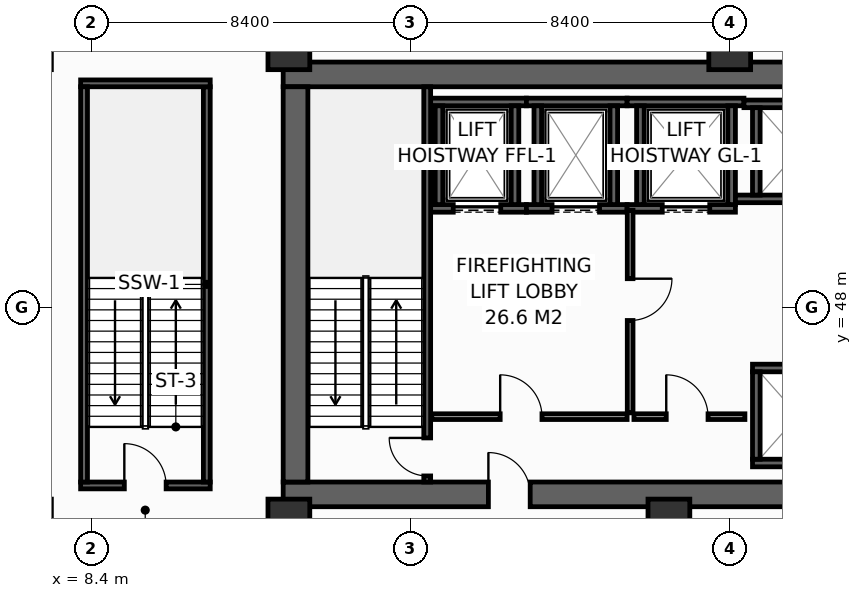
"""IFC4 building model, lengths in metres.
Left out: names, types, materials, properties, quantities, classifications, styles, units other than length and angle.
Written with IfcOpenShell. Run it as: python <this file> out.ifc"""

import sys

from ifc_helpers import new_model, si_unit, direction, frame, frame_2d, origin, origin_2d, place, context, subcontext, project, spatial, rectangle, extrude, element, fill, save


model = new_model("IFC4")
c1 = context("Model", 3, precision=1e-05, world=origin(), true_north=direction((0.0, 1.0)))
c2 = subcontext(c1, "Body", "Model", "MODEL_VIEW")
j1 = project(units=[si_unit("LENGTHUNIT", "METRE"), si_unit("PLANEANGLEUNIT", "RADIAN")], contexts=[c1])
p1 = place(None, origin())
s1 = spatial("IfcSite", under=j1, at=p1, CompositionType="ELEMENT")
p2 = place(p1, origin())
s2 = spatial("IfcBuilding", under=s1, at=p2, CompositionType="ELEMENT")
p3 = place(p2, frame((0.0, 0.0, -5.4)))
s3 = spatial("IfcBuildingStorey", under=s2, at=p3, CompositionType="ELEMENT", Elevation=-5.4)
p4 = place(p3, frame((13.45, 43.075, 0.0), z_axis=(0.0, 0.0, 1.0), x_axis=(1.0, 0.0, 0.0)))
e1 = element("IfcWall", 1, at=p4, inside=s3, PredefinedType="SHEAR", context=c2, shape_type="SweptSolid", body=[
    extrude(rectangle(XDim=33.0, YDim=0.65, at=frame_2d((16.5, 0.0))), origin(), (0.0, 0.0, 1.0), 5.05),
])
p5 = place(p4, frame((5.4, 0.0, 0.0)))
e2 = element("IfcOpeningElement", 2, at=p5, cuts=e1, PredefinedType="OPENING", context=c2, shape_type="SweptSolid", body=[
    extrude(rectangle(XDim=1.1, YDim=2.15, at=frame_2d((0.55, 1.075))), frame((0.0, 0.335, 0.0), z_axis=(0.0, -1.0, 0.0), x_axis=(1.0, 0.0, 0.0)), (0.0, 0.0, 1.0), 0.67),
])
p6 = place(p4, frame((25.6, 0.0, 0.0)))
e3 = element("IfcOpeningElement", 3, at=p6, cuts=e1, PredefinedType="OPENING", context=c2, shape_type="SweptSolid", body=[
    extrude(rectangle(XDim=1.1, YDim=2.15, at=frame_2d((0.55, 1.075))), frame((0.0, 0.335, 0.0), z_axis=(0.0, -1.0, 0.0), x_axis=(1.0, 0.0, 0.0)), (0.0, 0.0, 1.0), 0.67),
])
p7 = place(p3, frame((13.45, 54.125, 0.0), z_axis=(0.0, 0.0, 1.0), x_axis=(1.0, 0.0, 0.0)))
e4 = element("IfcWall", 4, at=p7, inside=s3, PredefinedType="SHEAR", context=c2, shape_type="SweptSolid", body=[
    extrude(rectangle(XDim=33.0, YDim=0.65, at=frame_2d((16.5, 0.0))), origin(), (0.0, 0.0, 1.0), 5.05),
])
p8 = place(p3, frame((13.775, 43.4, 0.0), z_axis=(0.0, 0.0, 1.0), x_axis=(0.0, 1.0, 0.0)))
e5 = element("IfcWall", 5, at=p8, inside=s3, PredefinedType="SHEAR", context=c2, shape_type="SweptSolid", body=[
    extrude(rectangle(XDim=10.4, YDim=0.65, at=frame_2d((5.2, 0.0))), origin(), (0.0, 0.0, 1.0), 5.05),
])
for number, where, z_axis, x_axis in (
    (6, (13.6, 54.8, 0.0), (0.0, 0.0, 1.0), (1.0, 0.0, 0.0)),
    (7, (25.2, 54.8, 0.0), (0.0, 0.0, 1.0), (1.0, 0.0, 0.0)),
    (8, (13.6, 42.4, 0.0), (0.0, 0.0, 1.0), (1.0, 0.0, 0.0)),
    (9, (23.6, 42.4, 0.0), (0.0, 0.0, 1.0), (1.0, 0.0, 0.0)),
):
    element("IfcColumn", number, at=place(p3, frame(where, z_axis=z_axis, x_axis=x_axis)), inside=s3, PredefinedType="COLUMN", context=c2, shape_type="SweptSolid", body=[
        extrude(rectangle(XDim=1.1, YDim=1.1, at=origin_2d()), origin(), (0.0, 0.0, 1.0), 5.4),
    ])
p9 = place(p3, frame((17.33, 50.6, 0.0), z_axis=(0.0, 0.0, 1.0), x_axis=(1.0, 0.0, 0.0)))
e10 = element("IfcWall", 10, at=p9, inside=s3, PredefinedType="SHEAR", context=c2, shape_type="SweptSolid", body=[
    extrude(rectangle(XDim=2.52, YDim=0.2, at=frame_2d((1.26, 0.0))), origin(), (0.0, 0.0, 1.0), 5.05),
])
p10 = place(p9, frame((0.595, 0.0, 0.0)))
e11 = element("IfcOpeningElement", 11, at=p10, cuts=e10, PredefinedType="OPENING", context=c2, shape_type="SweptSolid", body=[
    extrude(rectangle(XDim=1.25, YDim=2.3, at=frame_2d((0.625, 1.15))), frame((0.0, 0.11, 0.0), z_axis=(0.0, -1.0, 0.0), x_axis=(1.0, 0.0, 0.0)), (0.0, 0.0, 1.0), 0.22),
])
p11 = place(p3, frame((17.33, 53.4, 0.0), z_axis=(0.0, 0.0, 1.0), x_axis=(1.0, 0.0, 0.0)))
e12 = element("IfcWall", 12, at=p11, inside=s3, PredefinedType="SHEAR", context=c2, shape_type="SweptSolid", body=[
    extrude(rectangle(XDim=2.52, YDim=0.2, at=frame_2d((1.26, 0.0))), origin(), (0.0, 0.0, 1.0), 5.05),
])
for number, where, z_axis, x_axis in (
    (13, (17.55, 50.7, 0.0), (0.0, 0.0, 1.0), (0.0, 1.0, 0.0)),
    (14, (19.55, 50.7, 0.0), (0.0, 0.0, 1.0), (0.0, 1.0, 0.0)),
):
    element("IfcWall", number, at=place(p3, frame(where, z_axis=z_axis, x_axis=x_axis)), inside=s3, PredefinedType="SHEAR", context=c2, shape_type="SweptSolid", body=[
        extrude(rectangle(XDim=2.6, YDim=0.2, at=frame_2d((1.3, 0.0))), origin(), (0.0, 0.0, 1.0), 5.05),
    ])
p12 = place(p3, frame((19.85, 50.6, 0.0), z_axis=(0.0, 0.0, 1.0), x_axis=(1.0, 0.0, 0.0)))
e15 = element("IfcWall", 15, at=p12, inside=s3, PredefinedType="SHEAR", context=c2, shape_type="SweptSolid", body=[
    extrude(rectangle(XDim=2.65, YDim=0.2, at=frame_2d((1.325, 0.0))), origin(), (0.0, 0.0, 1.0), 5.05),
])
p13 = place(p12, frame((0.675, 0.0, 0.0)))
e16 = element("IfcOpeningElement", 16, at=p13, cuts=e15, PredefinedType="OPENING", context=c2, shape_type="SweptSolid", body=[
    extrude(rectangle(XDim=1.25, YDim=2.3, at=frame_2d((0.625, 1.15))), frame((0.0, 0.11, 0.0), z_axis=(0.0, -1.0, 0.0), x_axis=(1.0, 0.0, 0.0)), (0.0, 0.0, 1.0), 0.22),
])
p14 = place(p3, frame((19.85, 53.4, 0.0), z_axis=(0.0, 0.0, 1.0), x_axis=(1.0, 0.0, 0.0)))
e17 = element("IfcWall", 17, at=p14, inside=s3, PredefinedType="SHEAR", context=c2, shape_type="SweptSolid", body=[
    extrude(rectangle(XDim=2.65, YDim=0.2, at=frame_2d((1.325, 0.0))), origin(), (0.0, 0.0, 1.0), 5.05),
])
for number, where, z_axis, x_axis in (
    (18, (20.15, 50.7, 0.0), (0.0, 0.0, 1.0), (0.0, 1.0, 0.0)),
    (19, (22.15, 50.7, 0.0), (0.0, 0.0, 1.0), (0.0, 1.0, 0.0)),
):
    element("IfcWall", number, at=place(p3, frame(where, z_axis=z_axis, x_axis=x_axis)), inside=s3, PredefinedType="SHEAR", context=c2, shape_type="SweptSolid", body=[
        extrude(rectangle(XDim=2.6, YDim=0.2, at=frame_2d((1.3, 0.0))), origin(), (0.0, 0.0, 1.0), 5.05),
    ])
p15 = place(p3, frame((22.5, 50.6, 0.0), z_axis=(0.0, 0.0, 1.0), x_axis=(1.0, 0.0, 0.0)))
e20 = element("IfcWall", 20, at=p15, inside=s3, PredefinedType="SHEAR", context=c2, shape_type="SweptSolid", body=[
    extrude(rectangle(XDim=2.85, YDim=0.2, at=frame_2d((1.425, 0.0))), origin(), (0.0, 0.0, 1.0), 5.05),
])
p16 = place(p15, frame((0.925, 0.0, 0.0)))
e21 = element("IfcOpeningElement", 21, at=p16, cuts=e20, PredefinedType="OPENING", context=c2, shape_type="SweptSolid", body=[
    extrude(rectangle(XDim=1.25, YDim=2.3, at=frame_2d((0.625, 1.15))), frame((0.0, 0.11, 0.0), z_axis=(0.0, -1.0, 0.0), x_axis=(1.0, 0.0, 0.0)), (0.0, 0.0, 1.0), 0.22),
])
p17 = place(p3, frame((22.5, 53.4, 0.0), z_axis=(0.0, 0.0, 1.0), x_axis=(1.0, 0.0, 0.0)))
e22 = element("IfcWall", 22, at=p17, inside=s3, PredefinedType="SHEAR", context=c2, shape_type="SweptSolid", body=[
    extrude(rectangle(XDim=3.075, YDim=0.2, at=frame_2d((1.538, 0.0))), origin(), (0.0, 0.0, 1.0), 5.05),
])
for number, where, z_axis, x_axis in (
    (23, (22.85, 50.7, 0.0), (0.0, 0.0, 1.0), (0.0, 1.0, 0.0)),
    (24, (25.25, 50.7, 0.0), (0.0, 0.0, 1.0), (0.0, 1.0, 0.0)),
):
    element("IfcWall", number, at=place(p3, frame(where, z_axis=z_axis, x_axis=x_axis)), inside=s3, PredefinedType="SHEAR", context=c2, shape_type="SweptSolid", body=[
        extrude(rectangle(XDim=2.6, YDim=0.2, at=frame_2d((1.3, 0.0))), origin(), (0.0, 0.0, 1.0), 5.05),
    ])
p18 = place(p3, frame((25.35, 50.85, 0.0), z_axis=(0.0, 0.0, 1.0), x_axis=(1.0, 0.0, 0.0)))
e25 = element("IfcWall", 25, at=p18, inside=s3, PredefinedType="SHEAR", context=c2, shape_type="SweptSolid", body=[
    extrude(rectangle(XDim=3.025, YDim=0.2, at=frame_2d((1.512, 0.0))), origin(), (0.0, 0.0, 1.0), 5.05),
])
p19 = place(p3, frame((25.575, 53.35, 0.0), z_axis=(0.0, 0.0, 1.0), x_axis=(1.0, 0.0, 0.0)))
e26 = element("IfcWall", 26, at=p19, inside=s3, PredefinedType="SHEAR", context=c2, shape_type="SweptSolid", body=[
    extrude(rectangle(XDim=2.8, YDim=0.2, at=frame_2d((1.4, 0.0))), origin(), (0.0, 0.0, 1.0), 5.05),
])
p20 = place(p3, frame((25.9, 50.95, 0.0), z_axis=(0.0, 0.0, 1.0), x_axis=(0.0, 1.0, 0.0)))
e27 = element("IfcWall", 27, at=p20, inside=s3, PredefinedType="SHEAR", context=c2, shape_type="SweptSolid", body=[
    extrude(rectangle(XDim=2.3, YDim=0.2, at=frame_2d((1.15, 0.0))), origin(), (0.0, 0.0, 1.0), 5.05),
])
for number, where, z_axis, x_axis in (
    (28, (25.8, 43.9, 0.0), (0.0, 0.0, 1.0), (1.0, 0.0, 0.0)),
    (29, (25.8, 46.4, 0.0), (0.0, 0.0, 1.0), (1.0, 0.0, 0.0)),
):
    element("IfcWall", number, at=place(p3, frame(where, z_axis=z_axis, x_axis=x_axis)), inside=s3, PredefinedType="SHEAR", context=c2, shape_type="SweptSolid", body=[
        extrude(rectangle(XDim=2.575, YDim=0.2, at=frame_2d((1.288, 0.0))), origin(), (0.0, 0.0, 1.0), 5.05),
    ])
p21 = place(p3, frame((25.9, 44.0, 0.0), z_axis=(0.0, 0.0, 1.0), x_axis=(0.0, 1.0, 0.0)))
e30 = element("IfcWall", 30, at=p21, inside=s3, PredefinedType="SHEAR", context=c2, shape_type="SweptSolid", body=[
    extrude(rectangle(XDim=2.3, YDim=0.2, at=frame_2d((1.15, 0.0))), origin(), (0.0, 0.0, 1.0), 5.05),
])
p22 = place(p3, frame((17.24, 43.4, 0.0), z_axis=(0.0, 0.0, 1.0), x_axis=(0.0, 1.0, 0.0)))
e31 = element("IfcWall", 31, at=p22, inside=s3, PredefinedType="SHEAR", context=c2, shape_type="SweptSolid", body=[
    extrude(rectangle(XDim=10.4, YDim=0.18, at=frame_2d((5.2, 0.0))), origin(), (0.0, 0.0, 1.0), 5.05),
])
p23 = place(p22, frame((0.16, 0.0, 0.0)))
e32 = element("IfcOpeningElement", 32, at=p23, cuts=e31, PredefinedType="OPENING", context=c2, shape_type="SweptSolid", body=[
    extrude(rectangle(XDim=1.0, YDim=2.15, at=frame_2d((0.5, 1.075))), frame((0.0, 0.1, 0.0), z_axis=(0.0, -1.0, 0.0), x_axis=(1.0, 0.0, 0.0)), (0.0, 0.0, 1.0), 0.2),
])
p24 = place(p3, frame((8.12, 43.31, 0.0), z_axis=(0.0, 0.0, 1.0), x_axis=(1.0, 0.0, 0.0)))
e33 = element("IfcWall", 33, at=p24, inside=s3, PredefinedType="SHEAR", context=c2, shape_type="SweptSolid", body=[
    extrude(rectangle(XDim=3.41, YDim=0.18, at=frame_2d((1.705, 0.0))), origin(), (0.0, 0.0, 1.0), 5.05),
])
p25 = place(p24, frame((1.15, 0.0, 0.0)))
e34 = element("IfcOpeningElement", 34, at=p25, cuts=e33, PredefinedType="OPENING", context=c2, shape_type="SweptSolid", body=[
    extrude(rectangle(XDim=1.1, YDim=2.15, at=frame_2d((0.55, 1.075))), frame((0.0, 0.1, 0.0), z_axis=(0.0, -1.0, 0.0), x_axis=(1.0, 0.0, 0.0)), (0.0, 0.0, 1.0), 0.2),
])
p26 = place(p3, frame((11.44, 43.4, 0.0), z_axis=(0.0, 0.0, 1.0), x_axis=(0.0, 1.0, 0.0)))
e35 = element("IfcWall", 35, at=p26, inside=s3, PredefinedType="SHEAR", context=c2, shape_type="SweptSolid", body=[
    extrude(rectangle(XDim=10.4, YDim=0.18, at=frame_2d((5.2, 0.0))), origin(), (0.0, 0.0, 1.0), 5.05),
])
p27 = place(p3, frame((11.53, 53.89, 0.0), z_axis=(0.0, 0.0, 1.0), x_axis=(-1.0, 0.0, 0.0)))
e36 = element("IfcWall", 36, at=p27, inside=s3, PredefinedType="SHEAR", context=c2, shape_type="SweptSolid", body=[
    extrude(rectangle(XDim=3.41, YDim=0.18, at=frame_2d((1.705, 0.0))), origin(), (0.0, 0.0, 1.0), 5.05),
])
p28 = place(p3, frame((8.21, 53.8, 0.0), z_axis=(0.0, 0.0, 1.0), x_axis=(0.0, -1.0, 0.0)))
e37 = element("IfcWall", 37, at=p28, inside=s3, PredefinedType="SHEAR", context=c2, shape_type="SweptSolid", body=[
    extrude(rectangle(XDim=10.4, YDim=0.18, at=frame_2d((5.2, 0.0))), origin(), (0.0, 0.0, 1.0), 5.05),
])
p29 = place(p3, frame((17.36, 45.12, 0.0), z_axis=(0.0, 0.0, 1.0), x_axis=(1.0, 0.0, 0.0)))
e38 = element("IfcWall", 38, at=p29, inside=s3, PredefinedType="PARTITIONING", context=c2, shape_type="SweptSolid", body=[
    extrude(rectangle(XDim=5.14, YDim=0.15, at=frame_2d((2.57, 0.0))), origin(), (0.0, 0.0, 1.0), 5.05),
])
p30 = place(p29, frame((1.8, 0.0, 0.0)))
e39 = element("IfcOpeningElement", 39, at=p30, cuts=e38, PredefinedType="OPENING", context=c2, shape_type="SweptSolid", body=[
    extrude(rectangle(XDim=1.1, YDim=2.15, at=frame_2d((0.55, 1.075))), frame((0.0, 0.085, 0.0), z_axis=(0.0, -1.0, 0.0), x_axis=(1.0, 0.0, 0.0)), (0.0, 0.0, 1.0), 0.17),
])
p31 = place(p3, frame((22.58, 50.55, 0.0), z_axis=(0.0, 0.0, 1.0), x_axis=(0.0, -1.0, 0.0)))
e40 = element("IfcWall", 40, at=p31, inside=s3, PredefinedType="PARTITIONING", context=c2, shape_type="SweptSolid", body=[
    extrude(rectangle(XDim=5.33, YDim=0.15, at=frame_2d((2.665, 0.0))), origin(), (0.0, 0.0, 1.0), 5.05),
])
p32 = place(p31, frame((1.8, 0.0, 0.0)))
e41 = element("IfcOpeningElement", 41, at=p32, cuts=e40, PredefinedType="OPENING", context=c2, shape_type="SweptSolid", body=[
    extrude(rectangle(XDim=1.1, YDim=2.15, at=frame_2d((0.55, 1.075))), frame((0.0, 0.085, 0.0), z_axis=(0.0, -1.0, 0.0), x_axis=(1.0, 0.0, 0.0)), (0.0, 0.0, 1.0), 0.17),
])
p33 = place(p3, frame((22.68, 45.12, 0.0), z_axis=(0.0, 0.0, 1.0), x_axis=(1.0, 0.0, 0.0)))
e42 = element("IfcWall", 42, at=p33, inside=s3, PredefinedType="PARTITIONING", context=c2, shape_type="SweptSolid", body=[
    extrude(rectangle(XDim=2.92, YDim=0.15, at=frame_2d((1.46, 0.0))), origin(), (0.0, 0.0, 1.0), 5.05),
])
p34 = place(p33, frame((0.85, 0.0, 0.0)))
e43 = element("IfcOpeningElement", 43, at=p34, cuts=e42, PredefinedType="OPENING", context=c2, shape_type="SweptSolid", body=[
    extrude(rectangle(XDim=1.1, YDim=2.15, at=frame_2d((0.55, 1.075))), frame((0.0, 0.085, 0.0), z_axis=(0.0, -1.0, 0.0), x_axis=(1.0, 0.0, 0.0)), (0.0, 0.0, 1.0), 0.17),
])
p35 = place(p10, origin())
e44 = element("IfcDoor", 44, at=p35, inside=s3, OperationType="SLIDING_TO_LEFT", PredefinedType="DOOR", context=c2, shape_type="SweptSolid", body=[
    extrude(rectangle(XDim=1.25, YDim=2.3, at=frame_2d((0.625, 1.15))), frame((0.0, 0.025, 0.0), z_axis=(0.0, -1.0, 0.0), x_axis=(1.0, 0.0, 0.0)), (0.0, 0.0, 1.0), 0.05),
])
fill(e11, e44)
p36 = place(p13, origin())
e45 = element("IfcDoor", 45, at=p36, inside=s3, OperationType="SLIDING_TO_LEFT", PredefinedType="DOOR", context=c2, shape_type="SweptSolid", body=[
    extrude(rectangle(XDim=1.25, YDim=2.3, at=frame_2d((0.625, 1.15))), frame((0.0, 0.025, 0.0), z_axis=(0.0, -1.0, 0.0), x_axis=(1.0, 0.0, 0.0)), (0.0, 0.0, 1.0), 0.05),
])
fill(e16, e45)
p37 = place(p16, origin())
e46 = element("IfcDoor", 46, at=p37, inside=s3, OperationType="SLIDING_TO_LEFT", PredefinedType="DOOR", context=c2, shape_type="SweptSolid", body=[
    extrude(rectangle(XDim=1.25, YDim=2.3, at=frame_2d((0.625, 1.15))), frame((0.0, 0.025, 0.0), z_axis=(0.0, -1.0, 0.0), x_axis=(1.0, 0.0, 0.0)), (0.0, 0.0, 1.0), 0.05),
])
fill(e21, e46)
p38 = place(p23, origin())
e47 = element("IfcDoor", 47, at=p38, inside=s3, OperationType="SINGLE_SWING_RIGHT", PredefinedType="DOOR", context=c2, shape_type="SweptSolid", body=[
    extrude(rectangle(XDim=1.0, YDim=2.15, at=frame_2d((0.5, 1.075))), frame((0.0, 0.025, 0.0), z_axis=(0.0, -1.0, 0.0), x_axis=(1.0, 0.0, 0.0)), (0.0, 0.0, 1.0), 0.05),
])
fill(e32, e47)
p39 = place(p25, origin())
e48 = element("IfcDoor", 48, at=p39, inside=s3, OperationType="SINGLE_SWING_LEFT", PredefinedType="DOOR", context=c2, shape_type="SweptSolid", body=[
    extrude(rectangle(XDim=1.1, YDim=2.15, at=frame_2d((0.55, 1.075))), frame((0.0, 0.025, 0.0), z_axis=(0.0, -1.0, 0.0), x_axis=(1.0, 0.0, 0.0)), (0.0, 0.0, 1.0), 0.05),
])
fill(e34, e48)
p40 = place(p30, origin())
e49 = element("IfcDoor", 49, at=p40, inside=s3, OperationType="SINGLE_SWING_LEFT", PredefinedType="DOOR", context=c2, shape_type="SweptSolid", body=[
    extrude(rectangle(XDim=1.1, YDim=2.15, at=frame_2d((0.55, 1.075))), frame((0.0, 0.025, 0.0), z_axis=(0.0, -1.0, 0.0), x_axis=(1.0, 0.0, 0.0)), (0.0, 0.0, 1.0), 0.05),
])
fill(e39, e49)
p41 = place(p32, origin())
e50 = element("IfcDoor", 50, at=p41, inside=s3, OperationType="SINGLE_SWING_LEFT", PredefinedType="DOOR", context=c2, shape_type="SweptSolid", body=[
    extrude(rectangle(XDim=1.1, YDim=2.15, at=frame_2d((0.55, 1.075))), frame((0.0, 0.025, 0.0), z_axis=(0.0, -1.0, 0.0), x_axis=(1.0, 0.0, 0.0)), (0.0, 0.0, 1.0), 0.05),
])
fill(e41, e50)
p42 = place(p34, origin())
e51 = element("IfcDoor", 51, at=p42, inside=s3, OperationType="SINGLE_SWING_LEFT", PredefinedType="DOOR", context=c2, shape_type="SweptSolid", body=[
    extrude(rectangle(XDim=1.1, YDim=2.15, at=frame_2d((0.55, 1.075))), frame((0.0, 0.025, 0.0), z_axis=(0.0, -1.0, 0.0), x_axis=(1.0, 0.0, 0.0)), (0.0, 0.0, 1.0), 0.05),
])
fill(e43, e51)
p43 = place(p5, origin())
e52 = element("IfcDoor", 52, at=p43, inside=s3, OperationType="SINGLE_SWING_LEFT", PredefinedType="DOOR", context=c2, shape_type="SweptSolid", body=[
    extrude(rectangle(XDim=1.1, YDim=2.15, at=frame_2d((0.55, 1.075))), frame((0.0, 0.025, 0.0), z_axis=(0.0, -1.0, 0.0), x_axis=(1.0, 0.0, 0.0)), (0.0, 0.0, 1.0), 0.05),
])
fill(e2, e52)
save(model, sys.argv[1])
